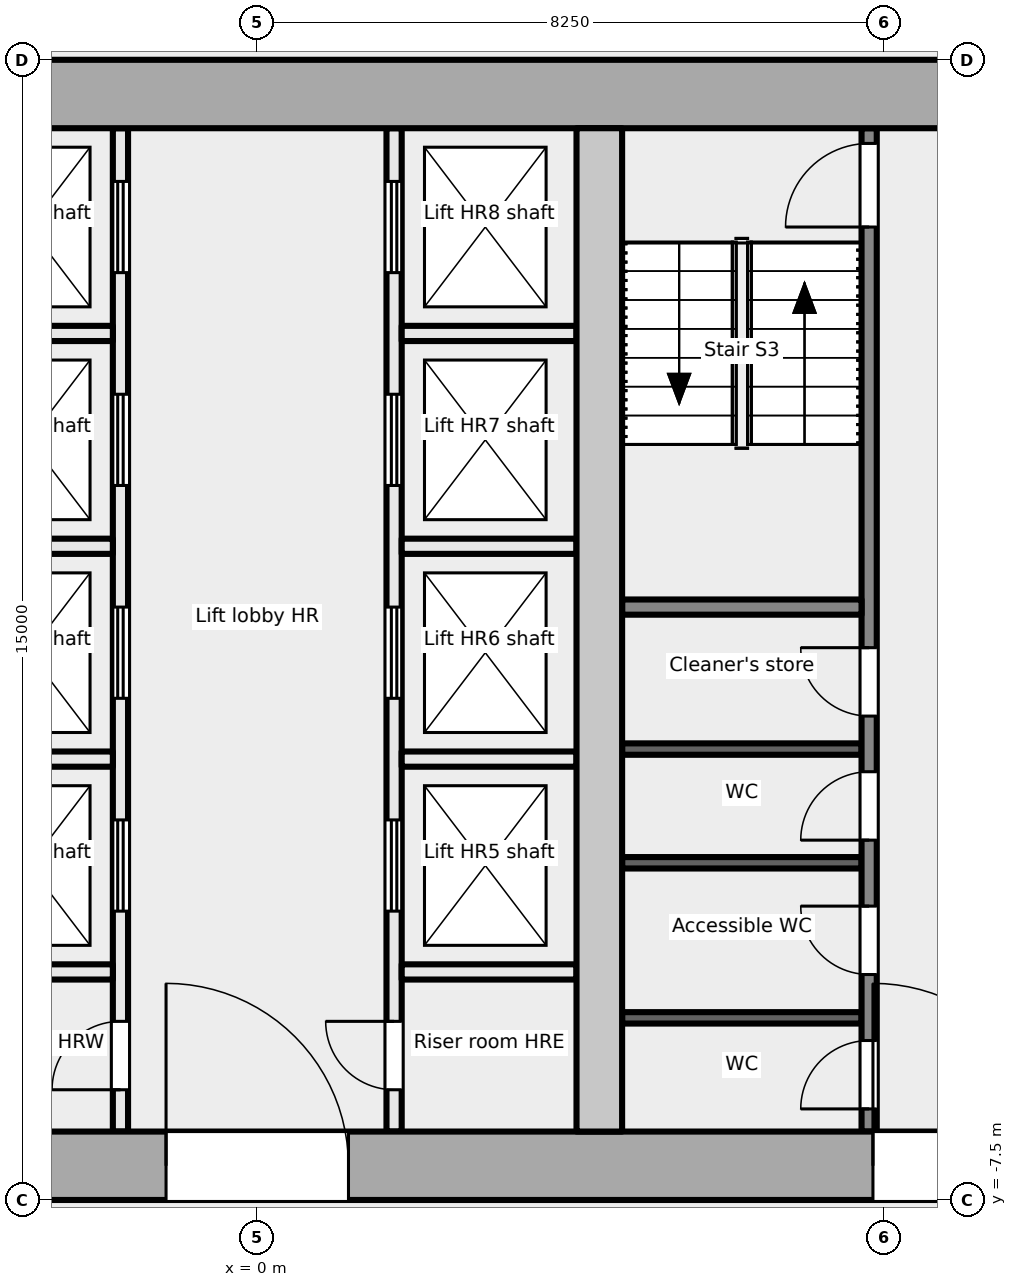
"""IFC4 building model, lengths in metres.
Left out: names, types, materials, properties, quantities, classifications, styles, units other than length and angle.
Written with IfcOpenShell. Run it as: python <this file> out.ifc"""

import sys

from ifc_helpers import new_model, si_unit, direction, frame, frame_2d, origin, place, context, subcontext, project, spatial, rectangle, extrude, element, fill, save


model = new_model("IFC4")
c1 = context("Model", 3, precision=1e-05, world=origin(), true_north=direction((0.0, 1.0)))
c2 = subcontext(c1, "Body", "Model", "MODEL_VIEW")
j1 = project(units=[si_unit("LENGTHUNIT", "METRE"), si_unit("PLANEANGLEUNIT", "RADIAN")], contexts=[c1])
p1 = place(None, origin())
s1 = spatial("IfcSite", under=j1, at=p1, CompositionType="ELEMENT")
p2 = place(p1, origin())
s2 = spatial("IfcBuilding", under=s1, at=p2, CompositionType="ELEMENT")
p3 = place(p2, frame((0.0, 0.0, 163.1)))
s3 = spatial("IfcBuildingStorey", under=s2, at=p3, CompositionType="ELEMENT", Elevation=163.1)
p4 = place(p3, frame((-18.0, -7.05, -0.2), z_axis=(0.0, 0.0, 1.0), x_axis=(1.0, 0.0, 0.0)))
e1 = element("IfcWall", 1, at=p4, inside=s3, PredefinedType="SHEAR", context=c2, shape_type="SweptSolid", body=[
    extrude(rectangle(XDim=36.0, YDim=0.9, at=frame_2d((18.0, 0.0))), origin(), (0.0, 0.0, 1.0), 5.4),
])
p5 = place(p4, frame((7.8, 0.0, 0.2)))
e2 = element("IfcOpeningElement", 2, at=p5, cuts=e1, PredefinedType="OPENING", context=c2, shape_type="SweptSolid", body=[
    extrude(rectangle(XDim=2.4, YDim=2.1, at=frame_2d((1.2, 1.05))), frame((0.0, 0.46, 0.0), z_axis=(0.0, -1.0, 0.0), x_axis=(1.0, 0.0, 0.0)), (0.0, 0.0, 1.0), 0.921),
])
p6 = place(p4, frame((16.8, 0.0, 0.2)))
e3 = element("IfcOpeningElement", 3, at=p6, cuts=e1, PredefinedType="OPENING", context=c2, shape_type="SweptSolid", body=[
    extrude(rectangle(XDim=2.4, YDim=2.1, at=frame_2d((1.2, 1.05))), frame((0.0, 0.46, 0.0), z_axis=(0.0, -1.0, 0.0), x_axis=(1.0, 0.0, 0.0)), (0.0, 0.0, 1.0), 0.921),
])
p7 = place(p4, frame((26.1, 0.0, 0.2)))
e4 = element("IfcOpeningElement", 4, at=p7, cuts=e1, PredefinedType="OPENING", context=c2, shape_type="SweptSolid", body=[
    extrude(rectangle(XDim=2.4, YDim=2.1, at=frame_2d((1.2, 1.05))), frame((0.0, 0.46, 0.0), z_axis=(0.0, -1.0, 0.0), x_axis=(1.0, 0.0, 0.0)), (0.0, 0.0, 1.0), 0.921),
])
p8 = place(p3, frame((-18.0, 7.05, -0.2), z_axis=(0.0, 0.0, 1.0), x_axis=(1.0, 0.0, 0.0)))
e5 = element("IfcWall", 5, at=p8, inside=s3, PredefinedType="SHEAR", context=c2, shape_type="SweptSolid", body=[
    extrude(rectangle(XDim=36.0, YDim=0.9, at=frame_2d((18.0, 0.0))), origin(), (0.0, 0.0, 1.0), 5.4),
])
p9 = place(p3, frame((4.5, -6.6, -0.2), z_axis=(0.0, 0.0, 1.0), x_axis=(0.0, 1.0, 0.0)))
e6 = element("IfcWall", 6, at=p9, inside=s3, PredefinedType="SHEAR", context=c2, shape_type="SweptSolid", body=[
    extrude(rectangle(XDim=13.2, YDim=0.6, at=frame_2d((6.6, 0.0))), origin(), (0.0, 0.0, 1.0), 5.4),
])
p10 = place(p3, frame((-1.8, -6.6, 0.0), z_axis=(0.0, 0.0, 1.0), x_axis=(0.0, 1.0, 0.0)))
e7 = element("IfcWall", 7, at=p10, inside=s3, PredefinedType="PARTITIONING", context=c2, shape_type="SweptSolid", body=[
    extrude(rectangle(XDim=13.2, YDim=0.2, at=frame_2d((6.6, 0.0))), origin(), (0.0, 0.0, 1.0), 5.2),
])
p11 = place(p10, frame((0.55, 0.0, 0.0)))
e8 = element("IfcOpeningElement", 8, at=p11, cuts=e7, PredefinedType="OPENING", context=c2, shape_type="SweptSolid", body=[
    extrude(rectangle(XDim=0.9, YDim=2.1, at=frame_2d((0.45, 1.05))), frame((0.0, 0.111, 0.0), z_axis=(0.0, -1.0, 0.0), x_axis=(1.0, 0.0, 0.0)), (0.0, 0.0, 1.0), 0.221),
])
p12 = place(p10, frame((2.9, 0.0, 0.0)))
e9 = element("IfcOpeningElement", 9, at=p12, cuts=e7, PredefinedType="OPENING", context=c2, shape_type="SweptSolid", body=[
    extrude(rectangle(XDim=1.2, YDim=2.1, at=frame_2d((0.6, 1.05))), frame((0.0, 0.111, 0.0), z_axis=(0.0, -1.0, 0.0), x_axis=(1.0, 0.0, 0.0)), (0.0, 0.0, 1.0), 0.221),
])
p13 = place(p10, frame((5.7, 0.0, 0.0)))
e10 = element("IfcOpeningElement", 10, at=p13, cuts=e7, PredefinedType="OPENING", context=c2, shape_type="SweptSolid", body=[
    extrude(rectangle(XDim=1.2, YDim=2.1, at=frame_2d((0.6, 1.05))), frame((0.0, 0.111, 0.0), z_axis=(0.0, -1.0, 0.0), x_axis=(1.0, 0.0, 0.0)), (0.0, 0.0, 1.0), 0.221),
])
p14 = place(p10, frame((8.5, 0.0, 0.0)))
e11 = element("IfcOpeningElement", 11, at=p14, cuts=e7, PredefinedType="OPENING", context=c2, shape_type="SweptSolid", body=[
    extrude(rectangle(XDim=1.2, YDim=2.1, at=frame_2d((0.6, 1.05))), frame((0.0, 0.111, 0.0), z_axis=(0.0, -1.0, 0.0), x_axis=(1.0, 0.0, 0.0)), (0.0, 0.0, 1.0), 0.221),
])
p15 = place(p10, frame((11.3, 0.0, 0.0)))
e12 = element("IfcOpeningElement", 12, at=p15, cuts=e7, PredefinedType="OPENING", context=c2, shape_type="SweptSolid", body=[
    extrude(rectangle(XDim=1.2, YDim=2.1, at=frame_2d((0.6, 1.05))), frame((0.0, 0.111, 0.0), z_axis=(0.0, -1.0, 0.0), x_axis=(1.0, 0.0, 0.0)), (0.0, 0.0, 1.0), 0.221),
])
p16 = place(p3, frame((1.8, -6.6, 0.0), z_axis=(0.0, 0.0, 1.0), x_axis=(0.0, 1.0, 0.0)))
e13 = element("IfcWall", 13, at=p16, inside=s3, PredefinedType="PARTITIONING", context=c2, shape_type="SweptSolid", body=[
    extrude(rectangle(XDim=13.2, YDim=0.2, at=frame_2d((6.6, 0.0))), origin(), (0.0, 0.0, 1.0), 5.2),
])
p17 = place(p16, frame((0.55, 0.0, 0.0)))
e14 = element("IfcOpeningElement", 14, at=p17, cuts=e13, PredefinedType="OPENING", context=c2, shape_type="SweptSolid", body=[
    extrude(rectangle(XDim=0.9, YDim=2.1, at=frame_2d((0.45, 1.05))), frame((0.0, 0.111, 0.0), z_axis=(0.0, -1.0, 0.0), x_axis=(1.0, 0.0, 0.0)), (0.0, 0.0, 1.0), 0.221),
])
p18 = place(p16, frame((2.9, 0.0, 0.0)))
e15 = element("IfcOpeningElement", 15, at=p18, cuts=e13, PredefinedType="OPENING", context=c2, shape_type="SweptSolid", body=[
    extrude(rectangle(XDim=1.2, YDim=2.1, at=frame_2d((0.6, 1.05))), frame((0.0, 0.111, 0.0), z_axis=(0.0, -1.0, 0.0), x_axis=(1.0, 0.0, 0.0)), (0.0, 0.0, 1.0), 0.221),
])
p19 = place(p16, frame((5.7, 0.0, 0.0)))
e16 = element("IfcOpeningElement", 16, at=p19, cuts=e13, PredefinedType="OPENING", context=c2, shape_type="SweptSolid", body=[
    extrude(rectangle(XDim=1.2, YDim=2.1, at=frame_2d((0.6, 1.05))), frame((0.0, 0.111, 0.0), z_axis=(0.0, -1.0, 0.0), x_axis=(1.0, 0.0, 0.0)), (0.0, 0.0, 1.0), 0.221),
])
p20 = place(p16, frame((8.5, 0.0, 0.0)))
e17 = element("IfcOpeningElement", 17, at=p20, cuts=e13, PredefinedType="OPENING", context=c2, shape_type="SweptSolid", body=[
    extrude(rectangle(XDim=1.2, YDim=2.1, at=frame_2d((0.6, 1.05))), frame((0.0, 0.111, 0.0), z_axis=(0.0, -1.0, 0.0), x_axis=(1.0, 0.0, 0.0)), (0.0, 0.0, 1.0), 0.221),
])
p21 = place(p16, frame((11.3, 0.0, 0.0)))
e18 = element("IfcOpeningElement", 18, at=p21, cuts=e13, PredefinedType="OPENING", context=c2, shape_type="SweptSolid", body=[
    extrude(rectangle(XDim=1.2, YDim=2.1, at=frame_2d((0.6, 1.05))), frame((0.0, 0.111, 0.0), z_axis=(0.0, -1.0, 0.0), x_axis=(1.0, 0.0, 0.0)), (0.0, 0.0, 1.0), 0.221),
])
for number, where, z_axis, x_axis in (
    (19, (-4.2, -1.7, 0.0), (0.0, 0.0, 1.0), (1.0, 0.0, 0.0)),
    (20, (-4.2, 1.1, 0.0), (0.0, 0.0, 1.0), (1.0, 0.0, 0.0)),
    (21, (-4.2, 3.9, 0.0), (0.0, 0.0, 1.0), (1.0, 0.0, 0.0)),
    (22, (-4.2, -4.5, 0.0), (0.0, 0.0, 1.0), (1.0, 0.0, 0.0)),
    (23, (1.9, -1.7, 0.0), (0.0, 0.0, 1.0), (1.0, 0.0, 0.0)),
    (24, (1.9, 1.1, 0.0), (0.0, 0.0, 1.0), (1.0, 0.0, 0.0)),
    (25, (1.9, 3.9, 0.0), (0.0, 0.0, 1.0), (1.0, 0.0, 0.0)),
    (26, (1.9, -4.5, 0.0), (0.0, 0.0, 1.0), (1.0, 0.0, 0.0)),
):
    element("IfcWall", number, at=place(p3, frame(where, z_axis=z_axis, x_axis=x_axis)), inside=s3, PredefinedType="PARTITIONING", context=c2, shape_type="SweptSolid", body=[
        extrude(rectangle(XDim=2.3, YDim=0.2, at=frame_2d((1.15, 0.0))), origin(), (0.0, 0.0, 1.0), 5.2),
    ])
p22 = place(p3, frame((8.05, -6.6, 0.0), z_axis=(0.0, 0.0, 1.0), x_axis=(0.0, 1.0, 0.0)))
e27 = element("IfcWall", 27, at=p22, inside=s3, PredefinedType="PARTITIONING", context=c2, shape_type="SweptSolid", body=[
    extrude(rectangle(XDim=13.2, YDim=0.2, at=frame_2d((6.6, 0.0))), origin(), (0.0, 0.0, 1.0), 5.2),
])
p23 = place(p22, frame((0.298, 0.0, 0.0)))
e28 = element("IfcOpeningElement", 28, at=p23, cuts=e27, PredefinedType="OPENING", context=c2, shape_type="SweptSolid", body=[
    extrude(rectangle(XDim=0.9, YDim=2.1, at=frame_2d((0.45, 1.05))), frame((0.0, 0.111, 0.0), z_axis=(0.0, -1.0, 0.0), x_axis=(1.0, 0.0, 0.0)), (0.0, 0.0, 1.0), 0.221),
])
p24 = place(p22, frame((2.066, 0.0, 0.0)))
e29 = element("IfcOpeningElement", 29, at=p24, cuts=e27, PredefinedType="OPENING", context=c2, shape_type="SweptSolid", body=[
    extrude(rectangle(XDim=0.9, YDim=2.1, at=frame_2d((0.45, 1.05))), frame((0.0, 0.111, 0.0), z_axis=(0.0, -1.0, 0.0), x_axis=(1.0, 0.0, 0.0)), (0.0, 0.0, 1.0), 0.221),
])
p25 = place(p22, frame((3.834, 0.0, 0.0)))
e30 = element("IfcOpeningElement", 30, at=p25, cuts=e27, PredefinedType="OPENING", context=c2, shape_type="SweptSolid", body=[
    extrude(rectangle(XDim=0.9, YDim=2.1, at=frame_2d((0.45, 1.05))), frame((0.0, 0.111, 0.0), z_axis=(0.0, -1.0, 0.0), x_axis=(1.0, 0.0, 0.0)), (0.0, 0.0, 1.0), 0.221),
])
p26 = place(p22, frame((5.466, 0.0, 0.0)))
e31 = element("IfcOpeningElement", 31, at=p26, cuts=e27, PredefinedType="OPENING", context=c2, shape_type="SweptSolid", body=[
    extrude(rectangle(XDim=0.9, YDim=2.1, at=frame_2d((0.45, 1.05))), frame((0.0, 0.111, 0.0), z_axis=(0.0, -1.0, 0.0), x_axis=(1.0, 0.0, 0.0)), (0.0, 0.0, 1.0), 0.221),
])
p27 = place(p22, frame((11.9, 0.0, 0.0)))
e32 = element("IfcOpeningElement", 32, at=p27, cuts=e27, PredefinedType="OPENING", context=c2, shape_type="SweptSolid", body=[
    extrude(rectangle(XDim=1.1, YDim=2.1, at=frame_2d((0.55, 1.05))), frame((0.0, 0.111, 0.0), z_axis=(0.0, -1.0, 0.0), x_axis=(1.0, 0.0, 0.0)), (0.0, 0.0, 1.0), 0.221),
])
p28 = place(p3, frame((4.8, 0.3, 0.0), z_axis=(0.0, 0.0, 1.0), x_axis=(1.0, 0.0, 0.0)))
e33 = element("IfcWall", 33, at=p28, inside=s3, PredefinedType="PARTITIONING", context=c2, shape_type="SweptSolid", body=[
    extrude(rectangle(XDim=3.15, YDim=0.2, at=frame_2d((1.575, 0.0))), origin(), (0.0, 0.0, 1.0), 5.2),
])
for number, where, z_axis, x_axis in (
    (34, (4.8, -5.104, 0.0), (0.0, 0.0, 1.0), (1.0, 0.0, 0.0)),
    (35, (4.8, -3.064, 0.0), (0.0, 0.0, 1.0), (1.0, 0.0, 0.0)),
    (36, (4.8, -1.568, 0.0), (0.0, 0.0, 1.0), (1.0, 0.0, 0.0)),
):
    element("IfcWall", number, at=place(p3, frame(where, z_axis=z_axis, x_axis=x_axis)), inside=s3, PredefinedType="PARTITIONING", context=c2, shape_type="SweptSolid", body=[
        extrude(rectangle(XDim=3.15, YDim=0.15, at=frame_2d((1.575, 0.0))), origin(), (0.0, 0.0, 1.0), 5.2),
    ])
p29 = place(p11, origin())
e37 = element("IfcDoor", 37, at=p29, inside=s3, OperationType="SINGLE_SWING_LEFT", PredefinedType="DOOR", context=c2, shape_type="SweptSolid", body=[
    extrude(rectangle(XDim=0.9, YDim=2.1, at=frame_2d((0.45, 1.05))), frame((0.0, 0.025, 0.0), z_axis=(0.0, -1.0, 0.0), x_axis=(1.0, 0.0, 0.0)), (0.0, 0.0, 1.0), 0.05),
])
fill(e8, e37)
p30 = place(p12, origin())
e38 = element("IfcDoor", 38, at=p30, inside=s3, OperationType="DOUBLE_DOOR_SLIDING", PredefinedType="DOOR", context=c2, shape_type="SweptSolid", body=[
    extrude(rectangle(XDim=1.2, YDim=2.1, at=frame_2d((0.6, 1.05))), frame((0.0, 0.025, 0.0), z_axis=(0.0, -1.0, 0.0), x_axis=(1.0, 0.0, 0.0)), (0.0, 0.0, 1.0), 0.05),
])
fill(e9, e38)
p31 = place(p13, origin())
e39 = element("IfcDoor", 39, at=p31, inside=s3, OperationType="DOUBLE_DOOR_SLIDING", PredefinedType="DOOR", context=c2, shape_type="SweptSolid", body=[
    extrude(rectangle(XDim=1.2, YDim=2.1, at=frame_2d((0.6, 1.05))), frame((0.0, 0.025, 0.0), z_axis=(0.0, -1.0, 0.0), x_axis=(1.0, 0.0, 0.0)), (0.0, 0.0, 1.0), 0.05),
])
fill(e10, e39)
p32 = place(p14, origin())
e40 = element("IfcDoor", 40, at=p32, inside=s3, OperationType="DOUBLE_DOOR_SLIDING", PredefinedType="DOOR", context=c2, shape_type="SweptSolid", body=[
    extrude(rectangle(XDim=1.2, YDim=2.1, at=frame_2d((0.6, 1.05))), frame((0.0, 0.025, 0.0), z_axis=(0.0, -1.0, 0.0), x_axis=(1.0, 0.0, 0.0)), (0.0, 0.0, 1.0), 0.05),
])
fill(e11, e40)
p33 = place(p15, origin())
e41 = element("IfcDoor", 41, at=p33, inside=s3, OperationType="DOUBLE_DOOR_SLIDING", PredefinedType="DOOR", context=c2, shape_type="SweptSolid", body=[
    extrude(rectangle(XDim=1.2, YDim=2.1, at=frame_2d((0.6, 1.05))), frame((0.0, 0.025, 0.0), z_axis=(0.0, -1.0, 0.0), x_axis=(1.0, 0.0, 0.0)), (0.0, 0.0, 1.0), 0.05),
])
fill(e12, e41)
p34 = place(p17, origin())
e42 = element("IfcDoor", 42, at=p34, inside=s3, OperationType="SINGLE_SWING_RIGHT", PredefinedType="DOOR", context=c2, shape_type="SweptSolid", body=[
    extrude(rectangle(XDim=0.9, YDim=2.1, at=frame_2d((0.45, 1.05))), frame((0.0, 0.025, 0.0), z_axis=(0.0, -1.0, 0.0), x_axis=(1.0, 0.0, 0.0)), (0.0, 0.0, 1.0), 0.05),
])
fill(e14, e42)
p35 = place(p18, origin())
e43 = element("IfcDoor", 43, at=p35, inside=s3, OperationType="DOUBLE_DOOR_SLIDING", PredefinedType="DOOR", context=c2, shape_type="SweptSolid", body=[
    extrude(rectangle(XDim=1.2, YDim=2.1, at=frame_2d((0.6, 1.05))), frame((0.0, 0.025, 0.0), z_axis=(0.0, -1.0, 0.0), x_axis=(1.0, 0.0, 0.0)), (0.0, 0.0, 1.0), 0.05),
])
fill(e15, e43)
p36 = place(p19, origin())
e44 = element("IfcDoor", 44, at=p36, inside=s3, OperationType="DOUBLE_DOOR_SLIDING", PredefinedType="DOOR", context=c2, shape_type="SweptSolid", body=[
    extrude(rectangle(XDim=1.2, YDim=2.1, at=frame_2d((0.6, 1.05))), frame((0.0, 0.025, 0.0), z_axis=(0.0, -1.0, 0.0), x_axis=(1.0, 0.0, 0.0)), (0.0, 0.0, 1.0), 0.05),
])
fill(e16, e44)
p37 = place(p20, origin())
e45 = element("IfcDoor", 45, at=p37, inside=s3, OperationType="DOUBLE_DOOR_SLIDING", PredefinedType="DOOR", context=c2, shape_type="SweptSolid", body=[
    extrude(rectangle(XDim=1.2, YDim=2.1, at=frame_2d((0.6, 1.05))), frame((0.0, 0.025, 0.0), z_axis=(0.0, -1.0, 0.0), x_axis=(1.0, 0.0, 0.0)), (0.0, 0.0, 1.0), 0.05),
])
fill(e17, e45)
p38 = place(p21, origin())
e46 = element("IfcDoor", 46, at=p38, inside=s3, OperationType="DOUBLE_DOOR_SLIDING", PredefinedType="DOOR", context=c2, shape_type="SweptSolid", body=[
    extrude(rectangle(XDim=1.2, YDim=2.1, at=frame_2d((0.6, 1.05))), frame((0.0, 0.025, 0.0), z_axis=(0.0, -1.0, 0.0), x_axis=(1.0, 0.0, 0.0)), (0.0, 0.0, 1.0), 0.05),
])
fill(e18, e46)
p39 = place(p6, origin())
e47 = element("IfcDoor", 47, at=p39, inside=s3, OperationType="DOUBLE_DOOR_DOUBLE_SWING", PredefinedType="DOOR", context=c2, shape_type="SweptSolid", body=[
    extrude(rectangle(XDim=2.4, YDim=2.1, at=frame_2d((1.2, 1.05))), frame((0.0, 0.025, 0.0), z_axis=(0.0, -1.0, 0.0), x_axis=(1.0, 0.0, 0.0)), (0.0, 0.0, 1.0), 0.05),
])
fill(e3, e47)
p40 = place(p23, origin())
e48 = element("IfcDoor", 48, at=p40, inside=s3, OperationType="SINGLE_SWING_LEFT", PredefinedType="DOOR", context=c2, shape_type="SweptSolid", body=[
    extrude(rectangle(XDim=0.9, YDim=2.1, at=frame_2d((0.45, 1.05))), frame((0.0, 0.025, 0.0), z_axis=(0.0, -1.0, 0.0), x_axis=(1.0, 0.0, 0.0)), (0.0, 0.0, 1.0), 0.05),
])
fill(e28, e48)
p41 = place(p24, origin())
e49 = element("IfcDoor", 49, at=p41, inside=s3, OperationType="SINGLE_SWING_RIGHT", PredefinedType="DOOR", context=c2, shape_type="SweptSolid", body=[
    extrude(rectangle(XDim=0.9, YDim=2.1, at=frame_2d((0.45, 1.05))), frame((0.0, 0.025, 0.0), z_axis=(0.0, -1.0, 0.0), x_axis=(1.0, 0.0, 0.0)), (0.0, 0.0, 1.0), 0.05),
])
fill(e29, e49)
p42 = place(p25, origin())
e50 = element("IfcDoor", 50, at=p42, inside=s3, OperationType="SINGLE_SWING_LEFT", PredefinedType="DOOR", context=c2, shape_type="SweptSolid", body=[
    extrude(rectangle(XDim=0.9, YDim=2.1, at=frame_2d((0.45, 1.05))), frame((0.0, 0.025, 0.0), z_axis=(0.0, -1.0, 0.0), x_axis=(1.0, 0.0, 0.0)), (0.0, 0.0, 1.0), 0.05),
])
fill(e30, e50)
p43 = place(p26, origin())
e51 = element("IfcDoor", 51, at=p43, inside=s3, OperationType="SINGLE_SWING_RIGHT", PredefinedType="DOOR", context=c2, shape_type="SweptSolid", body=[
    extrude(rectangle(XDim=0.9, YDim=2.1, at=frame_2d((0.45, 1.05))), frame((0.0, 0.025, 0.0), z_axis=(0.0, -1.0, 0.0), x_axis=(1.0, 0.0, 0.0)), (0.0, 0.0, 1.0), 0.05),
])
fill(e31, e51)
p44 = place(p27, origin())
e52 = element("IfcDoor", 52, at=p44, inside=s3, OperationType="SINGLE_SWING_LEFT", PredefinedType="DOOR", context=c2, shape_type="SweptSolid", body=[
    extrude(rectangle(XDim=1.1, YDim=2.1, at=frame_2d((0.55, 1.05))), frame((0.0, 0.025, 0.0), z_axis=(0.0, -1.0, 0.0), x_axis=(1.0, 0.0, 0.0)), (0.0, 0.0, 1.0), 0.05),
])
fill(e32, e52)
p45 = place(p7, origin())
e53 = element("IfcDoor", 53, at=p45, inside=s3, OperationType="DOUBLE_DOOR_DOUBLE_SWING", PredefinedType="DOOR", context=c2, shape_type="SweptSolid", body=[
    extrude(rectangle(XDim=2.4, YDim=2.1, at=frame_2d((1.2, 1.05))), frame((0.0, 0.025, 0.0), z_axis=(0.0, -1.0, 0.0), x_axis=(1.0, 0.0, 0.0)), (0.0, 0.0, 1.0), 0.05),
])
fill(e4, e53)
save(model, sys.argv[1])
